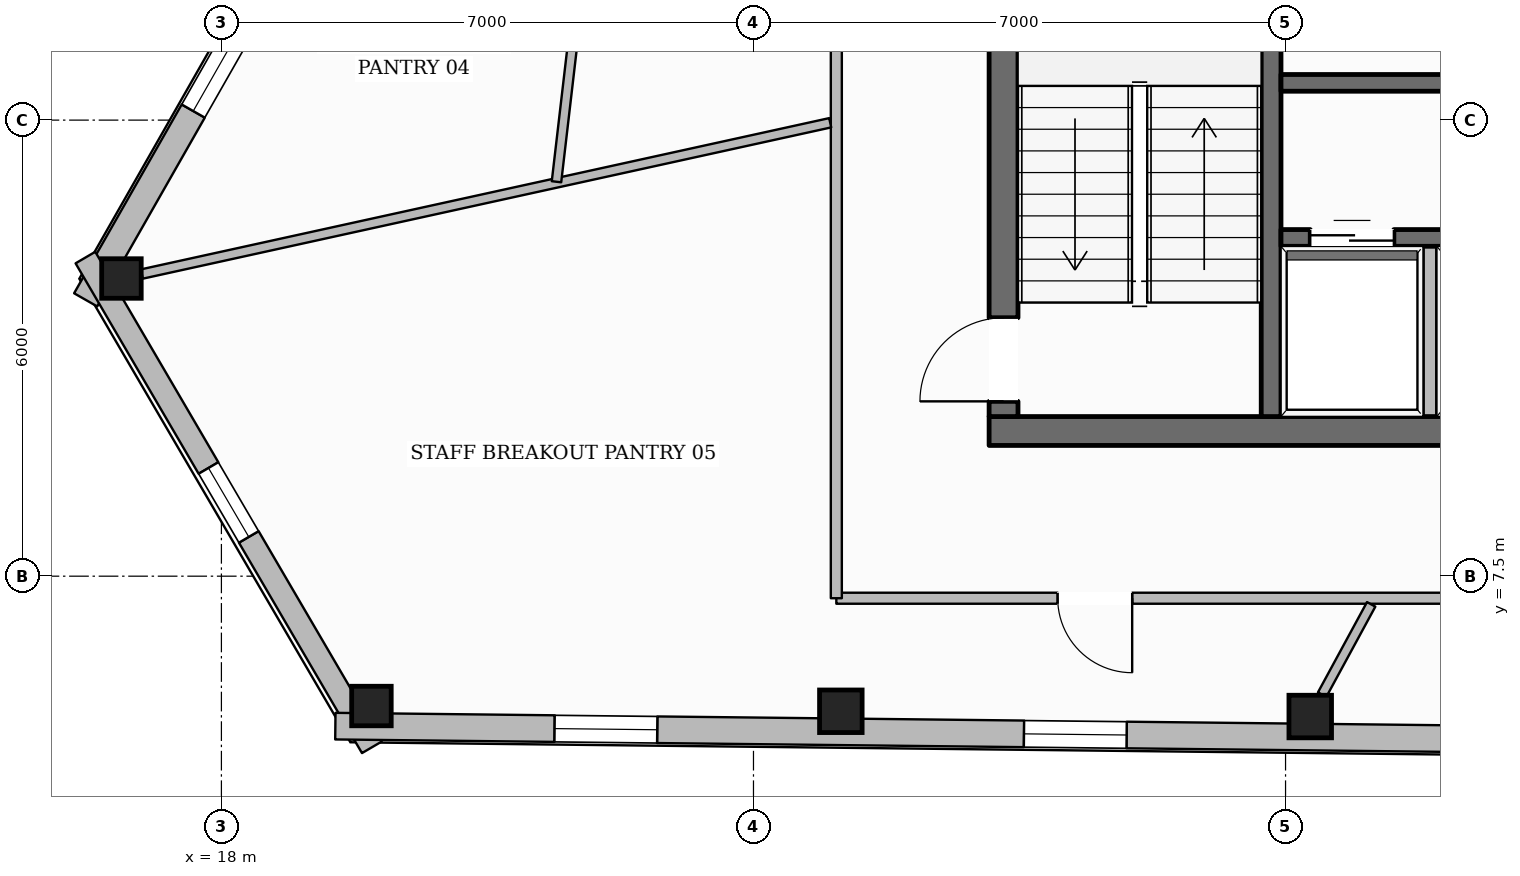
"""IFC4 building model, lengths in metres.
Left out: names, types, materials, properties, quantities, classifications, styles, units other than length and angle.
Written with IfcOpenShell. Run it as: python <this file> out.ifc"""

import sys

from ifc_helpers import new_model, si_unit, direction, frame, frame_2d, origin, origin_2d, place, context, subcontext, project, spatial, rectangle, hollow_rectangle, extrude, element, fill, save


model = new_model("IFC4")
c1 = context("Model", 3, precision=1e-05, world=origin(), true_north=direction((0.0, 1.0)))
c2 = subcontext(c1, "Body", "Model", "MODEL_VIEW")
j1 = project(units=[si_unit("LENGTHUNIT", "METRE"), si_unit("PLANEANGLEUNIT", "RADIAN")], contexts=[c1])
p1 = place(None, origin())
s1 = spatial("IfcSite", under=j1, at=p1, CompositionType="ELEMENT")
p2 = place(p1, origin())
s2 = spatial("IfcBuilding", under=s1, at=p2, CompositionType="ELEMENT")
p3 = place(p2, frame((0.0, 0.0, 258.75)))
s3 = spatial("IfcBuildingStorey", under=s2, at=p3, CompositionType="ELEMENT", Elevation=258.75)
p4 = place(p3, frame((28.1, 9.41, 0.0), z_axis=(0.0, 0.0, 1.0), x_axis=(1.0, 0.0, 0.0)))
e1 = element("IfcWall", 1, at=p4, inside=s3, PredefinedType="SOLIDWALL", context=c2, shape_type="SweptSolid", body=[
    extrude(rectangle(XDim=19.8, YDim=0.38, at=frame_2d((9.9, 0.0))), origin(), (0.0, 0.0, 1.0), 3.61),
])
p5 = place(p4, frame((10.4, 0.0, 0.0)))
e2 = element("IfcOpeningElement", 2, at=p5, cuts=e1, PredefinedType="OPENING", context=c2, shape_type="SweptSolid", body=[
    extrude(rectangle(XDim=1.4, YDim=2.2, at=frame_2d((0.7, 1.1))), frame((0.0, 0.2, 0.0), z_axis=(0.0, -1.0, 0.0), x_axis=(1.0, 0.0, 0.0)), (0.0, 0.0, 1.0), 0.4),
])
p6 = place(p3, frame((28.29, 9.6, 0.0), z_axis=(0.0, 0.0, 1.0), x_axis=(0.0, 1.0, 0.0)))
e3 = element("IfcWall", 3, at=p6, inside=s3, PredefinedType="SOLIDWALL", context=c2, shape_type="SweptSolid", body=[
    extrude(rectangle(XDim=13.0, YDim=0.38, at=frame_2d((6.5, 0.0))), origin(), (0.0, 0.0, 1.0), 3.61),
])
p7 = place(p6, frame((0.2, 0.0, 0.0)))
e4 = element("IfcOpeningElement", 4, at=p7, cuts=e3, PredefinedType="OPENING", context=c2, shape_type="SweptSolid", body=[
    extrude(rectangle(XDim=1.1, YDim=2.15, at=frame_2d((0.55, 1.075))), frame((0.0, 0.2, 0.0), z_axis=(0.0, -1.0, 0.0), x_axis=(1.0, 0.0, 0.0)), (0.0, 0.0, 1.0), 0.4),
])
p8 = place(p6, frame((8.4, 0.0, 0.0)))
e5 = element("IfcOpeningElement", 5, at=p8, cuts=e3, PredefinedType="OPENING", context=c2, shape_type="SweptSolid", body=[
    extrude(rectangle(XDim=0.9, YDim=2.1, at=frame_2d((0.45, 1.05))), frame((0.0, 0.2, 0.0), z_axis=(0.0, -1.0, 0.0), x_axis=(1.0, 0.0, 0.0)), (0.0, 0.0, 1.0), 0.4),
])
p9 = place(p3, frame((31.81, 9.6, 0.0), z_axis=(0.0, 0.0, 1.0), x_axis=(0.0, 1.0, 0.0)))
e6 = element("IfcWall", 6, at=p9, inside=s3, PredefinedType="SHEAR", context=c2, shape_type="SweptSolid", body=[
    extrude(rectangle(XDim=13.0, YDim=0.26, at=frame_2d((6.5, 0.0))), origin(), (0.0, 0.0, 1.0), 3.61),
])
p10 = place(p9, frame((10.925, 0.0, 0.0)))
e7 = element("IfcOpeningElement", 7, at=p10, cuts=e6, PredefinedType="OPENING", context=c2, shape_type="SweptSolid", body=[
    extrude(rectangle(XDim=1.25, YDim=2.25, at=frame_2d((0.625, 1.125))), frame((0.0, 0.14, 0.0), z_axis=(0.0, -1.0, 0.0), x_axis=(1.0, 0.0, 0.0)), (0.0, 0.0, 1.0), 0.28),
])
p11 = place(p3, frame((31.94, 13.99, 0.0), z_axis=(0.0, 0.0, 1.0), x_axis=(1.0, 0.0, 0.0)))
e8 = element("IfcWall", 8, at=p11, inside=s3, PredefinedType="SOLIDWALL", context=c2, shape_type="SweptSolid", body=[
    extrude(rectangle(XDim=12.12, YDim=0.22, at=frame_2d((6.06, 0.0))), origin(), (0.0, 0.0, 1.0), 3.61),
])
p12 = place(p11, frame((3.11, 0.0, 0.0)))
e9 = element("IfcOpeningElement", 9, at=p12, cuts=e8, PredefinedType="OPENING", context=c2, shape_type="SweptSolid", body=[
    extrude(rectangle(XDim=0.9, YDim=2.1, at=frame_2d((0.45, 1.05))), frame((0.0, 0.12, 0.0), z_axis=(0.0, -1.0, 0.0), x_axis=(1.0, 0.0, 0.0)), (0.0, 0.0, 1.0), 0.24),
])
p13 = place(p11, frame((9.21, 0.0, 0.0)))
e10 = element("IfcOpeningElement", 10, at=p13, cuts=e8, PredefinedType="OPENING", context=c2, shape_type="SweptSolid", body=[
    extrude(rectangle(XDim=0.9, YDim=2.1, at=frame_2d((0.45, 1.05))), frame((0.0, 0.12, 0.0), z_axis=(0.0, -1.0, 0.0), x_axis=(1.0, 0.0, 0.0)), (0.0, 0.0, 1.0), 0.24),
])
p14 = place(p3, frame((31.94, 11.95, 0.0), z_axis=(0.0, 0.0, 1.0), x_axis=(1.0, 0.0, 0.0)))
e11 = element("IfcWall", 11, at=p14, inside=s3, PredefinedType="SOLIDWALL", context=c2, shape_type="SweptSolid", body=[
    extrude(rectangle(XDim=6.19, YDim=0.22, at=frame_2d((3.095, 0.0))), origin(), (0.0, 0.0, 1.0), 3.61),
])
p15 = place(p14, frame((0.385, 0.0, 0.0)))
e12 = element("IfcOpeningElement", 12, at=p15, cuts=e11, PredefinedType="OPENING", context=c2, shape_type="SweptSolid", body=[
    extrude(rectangle(XDim=1.1, YDim=2.2, at=frame_2d((0.55, 1.1))), frame((0.0, 0.12, 0.0), z_axis=(0.0, -1.0, 0.0), x_axis=(1.0, 0.0, 0.0)), (0.0, 0.0, 1.0), 0.24),
])
p16 = place(p14, frame((2.435, 0.0, 0.0)))
e13 = element("IfcOpeningElement", 13, at=p16, cuts=e11, PredefinedType="OPENING", context=c2, shape_type="SweptSolid", body=[
    extrude(rectangle(XDim=1.1, YDim=2.2, at=frame_2d((0.55, 1.1))), frame((0.0, 0.12, 0.0), z_axis=(0.0, -1.0, 0.0), x_axis=(1.0, 0.0, 0.0)), (0.0, 0.0, 1.0), 0.24),
])
p17 = place(p14, frame((4.485, 0.0, 0.0)))
e14 = element("IfcOpeningElement", 14, at=p17, cuts=e11, PredefinedType="OPENING", context=c2, shape_type="SweptSolid", body=[
    extrude(rectangle(XDim=1.1, YDim=2.2, at=frame_2d((0.55, 1.1))), frame((0.0, 0.12, 0.0), z_axis=(0.0, -1.0, 0.0), x_axis=(1.0, 0.0, 0.0)), (0.0, 0.0, 1.0), 0.24),
])
for number, where, z_axis, x_axis in (
    (15, (16.685, 11.416, 0.0), (0.0, 0.0, 1.0), (1.0, 0.0, 0.0)),
    (16, (19.974, 5.792, 0.0), (0.0, 0.0, 1.0), (1.0, 0.0, 0.0)),
):
    element("IfcColumn", number, at=place(p3, frame(where, z_axis=z_axis, x_axis=x_axis)), inside=s3, PredefinedType="COLUMN", context=c2, shape_type="SweptSolid", body=[
        extrude(hollow_rectangle(XDim=0.52, YDim=0.52, WallThickness=0.024, at=origin_2d()), origin(), (0.0, 0.0, 1.0), 3.61),
    ])
for number, where, z_axis, x_axis in (
    (17, (26.149, 5.723, 0.0), (0.0, 0.0, 1.0), (1.0, 0.0, 0.0)),
    (18, (32.325, 5.654, 0.0), (0.0, 0.0, 1.0), (1.0, 0.0, 0.0)),
):
    element("IfcColumn", number, at=place(p3, frame(where, z_axis=z_axis, x_axis=x_axis)), inside=s3, PredefinedType="COLUMN", context=c2, shape_type="SweptSolid", body=[
        extrude(hollow_rectangle(XDim=0.56, YDim=0.56, WallThickness=0.025, at=origin_2d()), origin(), (0.0, 0.0, 1.0), 3.61),
    ])
p18 = place(p3, frame((16.214, 11.135, 0.0), z_axis=(0.0, 0.0, 1.0), x_axis=(0.49510347201, 0.868834018673, 0.0)))
e19 = element("IfcWall", 19, at=p18, inside=s3, PredefinedType="STANDARD", context=c2, shape_type="SweptSolid", body=[
    extrude(rectangle(XDim=37.643, YDim=0.35, at=frame_2d((18.822, 0.0))), origin(), (0.0, 0.0, 1.0), 3.196),
])
p19 = place(p18, frame((33.429, 0.0, 0.65)))
e20 = element("IfcOpeningElement", 20, at=p19, cuts=e19, PredefinedType="OPENING", context=c2, shape_type="SweptSolid", body=[
    extrude(rectangle(XDim=1.35, YDim=1.75, at=frame_2d((0.675, 0.875))), frame((0.0, 0.185, 0.0), z_axis=(0.0, -1.0, 0.0), x_axis=(1.0, 0.0, 0.0)), (0.0, 0.0, 1.0), 0.37),
])
p20 = place(p18, frame((27.315, 0.0, 0.65)))
e21 = element("IfcOpeningElement", 21, at=p20, cuts=e19, PredefinedType="OPENING", context=c2, shape_type="SweptSolid", body=[
    extrude(rectangle(XDim=1.35, YDim=1.75, at=frame_2d((0.675, 0.875))), frame((0.0, 0.185, 0.0), z_axis=(0.0, -1.0, 0.0), x_axis=(1.0, 0.0, 0.0)), (0.0, 0.0, 1.0), 0.37),
])
p21 = place(p18, frame((15.087, 0.0, 0.65)))
e22 = element("IfcOpeningElement", 22, at=p21, cuts=e19, PredefinedType="OPENING", context=c2, shape_type="SweptSolid", body=[
    extrude(rectangle(XDim=1.35, YDim=1.75, at=frame_2d((0.675, 0.875))), frame((0.0, 0.185, 0.0), z_axis=(0.0, -1.0, 0.0), x_axis=(1.0, 0.0, 0.0)), (0.0, 0.0, 1.0), 0.37),
])
p22 = place(p18, frame((8.973, 0.0, 0.65)))
e23 = element("IfcOpeningElement", 23, at=p22, cuts=e19, PredefinedType="OPENING", context=c2, shape_type="SweptSolid", body=[
    extrude(rectangle(XDim=1.35, YDim=1.75, at=frame_2d((0.675, 0.875))), frame((0.0, 0.185, 0.0), z_axis=(0.0, -1.0, 0.0), x_axis=(1.0, 0.0, 0.0)), (0.0, 0.0, 1.0), 0.37),
])
p23 = place(p18, frame((2.859, 0.0, 0.65)))
e24 = element("IfcOpeningElement", 24, at=p23, cuts=e19, PredefinedType="OPENING", context=c2, shape_type="SweptSolid", body=[
    extrude(rectangle(XDim=1.35, YDim=1.75, at=frame_2d((0.675, 0.875))), frame((0.0, 0.185, 0.0), z_axis=(0.0, -1.0, 0.0), x_axis=(1.0, 0.0, 0.0)), (0.0, 0.0, 1.0), 0.37),
])
p24 = place(p3, frame((19.979, 5.248, 0.0), z_axis=(0.0, 0.0, 1.0), x_axis=(-0.50480008765, 0.863236277915, 0.0)))
e25 = element("IfcWall", 25, at=p24, inside=s3, PredefinedType="STANDARD", context=c2, shape_type="SweptSolid", body=[
    extrude(rectangle(XDim=7.464, YDim=0.3, at=frame_2d((3.732, 0.0))), origin(), (0.0, 0.0, 1.0), 3.196),
])
p25 = place(p24, frame((3.207, 0.0, 0.65)))
e26 = element("IfcOpeningElement", 26, at=p25, cuts=e25, PredefinedType="OPENING", context=c2, shape_type="SweptSolid", body=[
    extrude(rectangle(XDim=1.05, YDim=1.7, at=frame_2d((0.525, 0.85))), frame((0.0, 0.16, 0.0), z_axis=(0.0, -1.0, 0.0), x_axis=(1.0, 0.0, 0.0)), (0.0, 0.0, 1.0), 0.32),
])
p26 = place(p3, frame((57.506, 5.102, 0.0), z_axis=(0.0, 0.0, 1.0), x_axis=(-0.999937327785, 0.011195557226, 0.0)))
e27 = element("IfcWall", 27, at=p26, inside=s3, PredefinedType="STANDARD", context=c2, shape_type="SweptSolid", body=[
    extrude(rectangle(XDim=38.01, YDim=0.35, at=frame_2d((19.005, 0.0))), origin(), (0.0, 0.0, 1.0), 3.196),
])
p27 = place(p26, frame((33.775, 0.0, 0.65)))
e28 = element("IfcOpeningElement", 28, at=p27, cuts=e27, PredefinedType="OPENING", context=c2, shape_type="SweptSolid", body=[
    extrude(rectangle(XDim=1.35, YDim=1.75, at=frame_2d((0.675, 0.875))), frame((0.0, 0.185, 0.0), z_axis=(0.0, -1.0, 0.0), x_axis=(1.0, 0.0, 0.0)), (0.0, 0.0, 1.0), 0.37),
])
p28 = place(p26, frame((27.599, 0.0, 0.65)))
e29 = element("IfcOpeningElement", 29, at=p28, cuts=e27, PredefinedType="OPENING", context=c2, shape_type="SweptSolid", body=[
    extrude(rectangle(XDim=1.35, YDim=1.75, at=frame_2d((0.675, 0.875))), frame((0.0, 0.185, 0.0), z_axis=(0.0, -1.0, 0.0), x_axis=(1.0, 0.0, 0.0)), (0.0, 0.0, 1.0), 0.37),
])
p29 = place(p26, frame((15.247, 0.0, 0.65)))
e30 = element("IfcOpeningElement", 30, at=p29, cuts=e27, PredefinedType="OPENING", context=c2, shape_type="SweptSolid", body=[
    extrude(rectangle(XDim=1.35, YDim=1.75, at=frame_2d((0.675, 0.875))), frame((0.0, 0.185, 0.0), z_axis=(0.0, -1.0, 0.0), x_axis=(1.0, 0.0, 0.0)), (0.0, 0.0, 1.0), 0.37),
])
p30 = place(p26, frame((9.071, 0.0, 0.65)))
e31 = element("IfcOpeningElement", 31, at=p30, cuts=e27, PredefinedType="OPENING", context=c2, shape_type="SweptSolid", body=[
    extrude(rectangle(XDim=1.35, YDim=1.75, at=frame_2d((0.675, 0.875))), frame((0.0, 0.185, 0.0), z_axis=(0.0, -1.0, 0.0), x_axis=(1.0, 0.0, 0.0)), (0.0, 0.0, 1.0), 0.37),
])
p31 = place(p26, frame((2.896, 0.0, 0.65)))
e32 = element("IfcOpeningElement", 32, at=p31, cuts=e27, PredefinedType="OPENING", context=c2, shape_type="SweptSolid", body=[
    extrude(rectangle(XDim=1.35, YDim=1.75, at=frame_2d((0.675, 0.875))), frame((0.0, 0.185, 0.0), z_axis=(0.0, -1.0, 0.0), x_axis=(1.0, 0.0, 0.0)), (0.0, 0.0, 1.0), 0.37),
])
p32 = place(p3, frame((33.9, 9.49, 0.0), z_axis=(0.0, 0.0, 1.0), x_axis=(0.0, 1.0, 0.0)))
e33 = element("IfcWall", 33, at=p32, inside=s3, PredefinedType="PARTITIONING", context=c2, shape_type="SweptSolid", body=[
    extrude(rectangle(XDim=2.35, YDim=0.165, at=frame_2d((1.175, 0.0))), origin(), (0.0, 0.0, 1.0), 3.61),
])
p33 = place(p3, frame((49.91, 7.21, 0.0), z_axis=(0.0, 0.0, 1.0), x_axis=(-1.0, 0.0, 0.0)))
e34 = element("IfcWall", 34, at=p33, inside=s3, PredefinedType="PARTITIONING", context=c2, shape_type="SweptSolid", body=[
    extrude(rectangle(XDim=23.82, YDim=0.145, at=frame_2d((11.91, 0.0))), origin(), (0.0, 0.0, 1.0), 3.61),
])
p34 = place(p33, frame((19.928, 0.0, 0.0)))
e35 = element("IfcOpeningElement", 35, at=p34, cuts=e34, PredefinedType="OPENING", context=c2, shape_type="SweptSolid", body=[
    extrude(rectangle(XDim=0.98, YDim=2.15, at=frame_2d((0.49, 1.075))), frame((0.0, 0.083, 0.0), z_axis=(0.0, -1.0, 0.0), x_axis=(1.0, 0.0, 0.0)), (0.0, 0.0, 1.0), 0.165),
])
p35 = place(p33, frame((8.487, 0.0, 0.0)))
e36 = element("IfcOpeningElement", 36, at=p35, cuts=e34, PredefinedType="OPENING", context=c2, shape_type="SweptSolid", body=[
    extrude(rectangle(XDim=0.98, YDim=2.15, at=frame_2d((0.49, 1.075))), frame((0.0, 0.083, 0.0), z_axis=(0.0, -1.0, 0.0), x_axis=(1.0, 0.0, 0.0)), (0.0, 0.0, 1.0), 0.165),
])
p36 = place(p3, frame((26.09, 7.21, 0.0), z_axis=(0.0, 0.0, 1.0), x_axis=(0.0, 1.0, 0.0)))
e37 = element("IfcWall", 37, at=p36, inside=s3, PredefinedType="PARTITIONING", context=c2, shape_type="SweptSolid", body=[
    extrude(rectangle(XDim=17.78, YDim=0.145, at=frame_2d((8.89, 0.0))), origin(), (0.0, 0.0, 1.0), 3.349),
])
p37 = place(p36, frame((11.443, 0.0, 0.0)))
e38 = element("IfcOpeningElement", 38, at=p37, cuts=e37, PredefinedType="OPENING", context=c2, shape_type="SweptSolid", body=[
    extrude(rectangle(XDim=0.98, YDim=2.15, at=frame_2d((0.49, 1.075))), frame((0.0, 0.083, 0.0), z_axis=(0.0, -1.0, 0.0), x_axis=(1.0, 0.0, 0.0)), (0.0, 0.0, 1.0), 0.165),
])
p38 = place(p3, frame((26.01, 13.465, 0.0), z_axis=(0.0, 0.0, 1.0), x_axis=(-0.976700346334, -0.214607626778, 0.0)))
e39 = element("IfcWall", 39, at=p38, inside=s3, PredefinedType="PARTITIONING", context=c2, shape_type="SweptSolid", body=[
    extrude(rectangle(XDim=9.273, YDim=0.125, at=frame_2d((4.636, 0.0))), origin(), (0.0, 0.0, 1.0), 3.246),
])
p39 = place(p3, frame((33.127, 7.129, 0.0), z_axis=(0.0, 0.0, 1.0), x_axis=(-0.47743452788, -0.878667327029, 0.0)))
e40 = element("IfcWall", 40, at=p39, inside=s3, PredefinedType="PARTITIONING", context=c2, shape_type="SweptSolid", body=[
    extrude(rectangle(XDim=1.352, YDim=0.125, at=frame_2d((0.676, 0.0))), origin(), (0.0, 0.0, 1.0), 3.61),
])
p40 = place(p3, frame((23.733, 24.027, 0.0), z_axis=(0.0, 0.0, 1.0), x_axis=(-0.116028401935, -0.993245896012, 0.0)))
e41 = element("IfcWall", 41, at=p40, inside=s3, PredefinedType="PARTITIONING", context=c2, shape_type="SweptSolid", body=[
    extrude(rectangle(XDim=11.415, YDim=0.125, at=frame_2d((5.708, 0.0))), origin(), (0.0, 0.0, 1.0), 3.199),
])
p41 = place(p40, frame((5.142, 0.0, 0.0)))
e42 = element("IfcOpeningElement", 42, at=p41, cuts=e41, PredefinedType="OPENING", context=c2, shape_type="SweptSolid", body=[
    extrude(rectangle(XDim=0.98, YDim=2.15, at=frame_2d((0.49, 1.075))), frame((0.0, 0.073, 0.0), z_axis=(0.0, -1.0, 0.0), x_axis=(1.0, 0.0, 0.0)), (0.0, 0.0, 1.0), 0.145),
])
p42 = place(p23, origin())
e43 = element("IfcWindow", 43, at=p42, inside=s3, PartitioningType="SINGLE_PANEL", PredefinedType="WINDOW", context=c2, shape_type="SweptSolid", body=[
    extrude(rectangle(XDim=1.35, YDim=1.75, at=frame_2d((0.675, 0.875))), frame((0.0, 0.03, 0.0), z_axis=(0.0, -1.0, 0.0), x_axis=(1.0, 0.0, 0.0)), (0.0, 0.0, 1.0), 0.06),
])
fill(e24, e43)
p43 = place(p27, origin())
e44 = element("IfcWindow", 44, at=p43, inside=s3, PartitioningType="SINGLE_PANEL", PredefinedType="WINDOW", context=c2, shape_type="SweptSolid", body=[
    extrude(rectangle(XDim=1.35, YDim=1.75, at=frame_2d((0.675, 0.875))), frame((0.0, 0.03, 0.0), z_axis=(0.0, -1.0, 0.0), x_axis=(1.0, 0.0, 0.0)), (0.0, 0.0, 1.0), 0.06),
])
fill(e28, e44)
p44 = place(p28, origin())
e45 = element("IfcWindow", 45, at=p44, inside=s3, PartitioningType="SINGLE_PANEL", PredefinedType="WINDOW", context=c2, shape_type="SweptSolid", body=[
    extrude(rectangle(XDim=1.35, YDim=1.75, at=frame_2d((0.675, 0.875))), frame((0.0, 0.03, 0.0), z_axis=(0.0, -1.0, 0.0), x_axis=(1.0, 0.0, 0.0)), (0.0, 0.0, 1.0), 0.06),
])
fill(e29, e45)
p45 = place(p25, origin())
e46 = element("IfcWindow", 46, at=p45, inside=s3, PartitioningType="SINGLE_PANEL", PredefinedType="WINDOW", context=c2, shape_type="SweptSolid", body=[
    extrude(rectangle(XDim=1.05, YDim=1.7, at=frame_2d((0.525, 0.85))), frame((0.0, 0.03, 0.0), z_axis=(0.0, -1.0, 0.0), x_axis=(1.0, 0.0, 0.0)), (0.0, 0.0, 1.0), 0.06),
])
fill(e26, e46)
p46 = place(p7, origin())
e47 = element("IfcDoor", 47, at=p46, inside=s3, OperationType="SINGLE_SWING_LEFT", PredefinedType="DOOR", context=c2, shape_type="SweptSolid", body=[
    extrude(rectangle(XDim=1.1, YDim=2.15, at=frame_2d((0.55, 1.075))), frame((0.0, 0.025, 0.0), z_axis=(0.0, -1.0, 0.0), x_axis=(1.0, 0.0, 0.0)), (0.0, 0.0, 1.0), 0.05),
])
fill(e4, e47)
p47 = place(p15, origin())
e48 = element("IfcDoor", 48, at=p47, inside=s3, OperationType="DOUBLE_DOOR_SLIDING", PredefinedType="DOOR", context=c2, shape_type="SweptSolid", body=[
    extrude(rectangle(XDim=1.1, YDim=2.2, at=frame_2d((0.55, 1.1))), frame((0.0, 0.025, 0.0), z_axis=(0.0, -1.0, 0.0), x_axis=(1.0, 0.0, 0.0)), (0.0, 0.0, 1.0), 0.05),
])
fill(e12, e48)
p48 = place(p34, origin())
e49 = element("IfcDoor", 49, at=p48, inside=s3, OperationType="SINGLE_SWING_LEFT", PredefinedType="DOOR", context=c2, shape_type="SweptSolid", body=[
    extrude(rectangle(XDim=0.98, YDim=2.15, at=frame_2d((0.49, 1.075))), frame((0.0, 0.025, 0.0), z_axis=(0.0, -1.0, 0.0), x_axis=(1.0, 0.0, 0.0)), (0.0, 0.0, 1.0), 0.05),
])
fill(e35, e49)
save(model, sys.argv[1])
